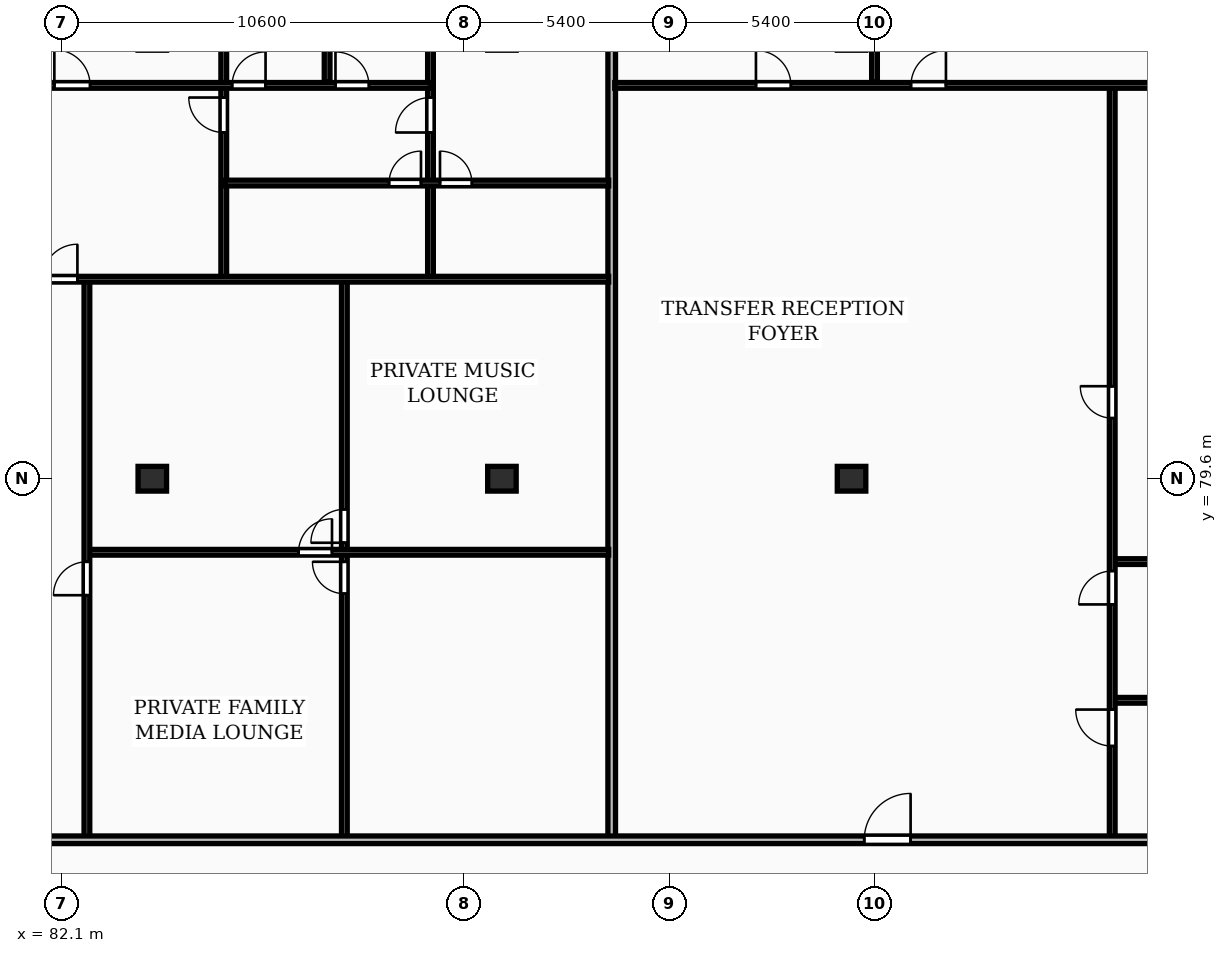
"""IFC4 building model, lengths in metres.
Left out: names, types, materials, properties, quantities, classifications, styles, units other than length and angle.
Written with IfcOpenShell. Run it as: python <this file> out.ifc"""

import sys

from ifc_helpers import new_model, si_unit, direction, frame, frame_2d, origin, origin_2d, place, context, subcontext, project, spatial, rectangle, extrude, element, fill, save


model = new_model("IFC4")
c1 = context("Model", 3, precision=1e-05, world=origin(), true_north=direction((0.0, 1.0)))
c2 = subcontext(c1, "Body", "Model", "MODEL_VIEW")
j1 = project(units=[si_unit("LENGTHUNIT", "METRE"), si_unit("PLANEANGLEUNIT", "RADIAN")], contexts=[c1])
p1 = place(None, origin())
s1 = spatial("IfcSite", under=j1, at=p1, CompositionType="ELEMENT")
p2 = place(p1, origin())
s2 = spatial("IfcBuilding", under=s1, at=p2, CompositionType="ELEMENT")
p3 = place(p2, frame((0.0, 0.0, 256.25)))
s3 = spatial("IfcBuildingStorey", under=s2, at=p3, CompositionType="ELEMENT", Elevation=256.25)
for number, where, z_axis, x_axis in (
    (1, (84.5, 79.6, 0.0), (0.0, 0.0, 1.0), (1.0, 0.0, 0.0)),
    (2, (93.7, 79.6, 0.0), (0.0, 0.0, 1.0), (1.0, 0.0, 0.0)),
    (3, (102.9, 79.6, 0.0), (0.0, 0.0, 1.0), (1.0, 0.0, 0.0)),
):
    element("IfcColumn", number, at=place(p3, frame(where, z_axis=z_axis, x_axis=x_axis)), inside=s3, PredefinedType="COLUMN", context=c2, shape_type="SweptSolid", body=[
        extrude(rectangle(XDim=0.75, YDim=0.65, at=origin_2d()), origin(), (0.0, 0.0, 1.0), 3.45),
    ])
p4 = place(p3, frame((96.589, 70.18, 0.0), z_axis=(0.0, 0.0, 1.0), x_axis=(0.0, 1.0, 0.0)))
e4 = element("IfcWall", 4, at=p4, inside=s3, PredefinedType="PARTITIONING", context=c2, shape_type="SweptSolid", body=[
    extrude(rectangle(XDim=24.32, YDim=0.2, at=frame_2d((12.16, 0.0))), origin(), (0.0, 0.0, 1.0), 3.17),
])
p5 = place(p3, frame((89.554, 70.16, 0.0), z_axis=(0.0, 0.0, 1.0), x_axis=(0.0, 1.0, 0.0)))
e5 = element("IfcWall", 5, at=p5, inside=s3, PredefinedType="PARTITIONING", context=c2, shape_type="SweptSolid", body=[
    extrude(rectangle(XDim=14.65, YDim=0.15, at=frame_2d((7.325, 0.0))), origin(), (0.0, 0.0, 1.0), 3.17),
])
p6 = place(p5, frame((6.415, 0.0, 0.0)))
e6 = element("IfcOpeningElement", 6, at=p6, cuts=e5, PredefinedType="OPENING", context=c2, shape_type="SweptSolid", body=[
    extrude(rectangle(XDim=0.84, YDim=2.04, at=frame_2d((0.42, 1.02))), frame((0.0, 0.085, 0.0), z_axis=(0.0, -1.0, 0.0), x_axis=(1.0, 0.0, 0.0)), (0.0, 0.0, 1.0), 0.17),
])
p7 = place(p5, frame((7.755, 0.0, 0.0)))
e7 = element("IfcOpeningElement", 7, at=p7, cuts=e5, PredefinedType="OPENING", context=c2, shape_type="SweptSolid", body=[
    extrude(rectangle(XDim=0.88, YDim=2.06, at=frame_2d((0.44, 1.03))), frame((0.0, 0.085, 0.0), z_axis=(0.0, -1.0, 0.0), x_axis=(1.0, 0.0, 0.0)), (0.0, 0.0, 1.0), 0.17),
])
p8 = place(p3, frame((82.839, 77.665, 0.0), z_axis=(0.0, 0.0, 1.0), x_axis=(1.0, 0.0, 0.0)))
e8 = element("IfcWall", 8, at=p8, inside=s3, PredefinedType="PARTITIONING", context=c2, shape_type="SweptSolid", body=[
    extrude(rectangle(XDim=13.669, YDim=0.15, at=frame_2d((6.835, 0.0))), origin(), (0.0, 0.0, 1.0), 3.17),
])
p9 = place(p8, frame((5.51, 0.0, 0.0)))
e9 = element("IfcOpeningElement", 9, at=p9, cuts=e8, PredefinedType="OPENING", context=c2, shape_type="SweptSolid", body=[
    extrude(rectangle(XDim=0.88, YDim=2.06, at=frame_2d((0.44, 1.03))), frame((0.0, 0.085, 0.0), z_axis=(0.0, -1.0, 0.0), x_axis=(1.0, 0.0, 0.0)), (0.0, 0.0, 1.0), 0.17),
])
p10 = place(p3, frame((82.779, 70.16, 0.0), z_axis=(0.0, 0.0, 1.0), x_axis=(0.0, 1.0, 0.0)))
e10 = element("IfcWall", 10, at=p10, inside=s3, PredefinedType="PARTITIONING", context=c2, shape_type="SweptSolid", body=[
    extrude(rectangle(XDim=14.65, YDim=0.15, at=frame_2d((7.325, 0.0))), origin(), (0.0, 0.0, 1.0), 3.17),
])
p11 = place(p10, frame((6.375, 0.0, 0.0)))
e11 = element("IfcOpeningElement", 11, at=p11, cuts=e10, PredefinedType="OPENING", context=c2, shape_type="SweptSolid", body=[
    extrude(rectangle(XDim=0.88, YDim=2.06, at=frame_2d((0.44, 1.03))), frame((0.0, 0.085, 0.0), z_axis=(0.0, -1.0, 0.0), x_axis=(1.0, 0.0, 0.0)), (0.0, 0.0, 1.0), 0.17),
])
p12 = place(p3, frame((89.1, 90.03, 0.0), z_axis=(0.0, 0.0, 1.0), x_axis=(0.0, 1.0, 0.0)))
e12 = element("IfcWall", 12, at=p12, inside=s3, PredefinedType="PARTITIONING", context=c2, shape_type="SweptSolid", body=[
    extrude(rectangle(XDim=4.47, YDim=0.15, at=frame_2d((2.235, 0.0))), origin(), (0.0, 0.0, 1.0), 3.17),
])
p13 = place(p3, frame((86.38, 84.89, 0.0), z_axis=(0.0, 0.0, 1.0), x_axis=(0.0, 1.0, 0.0)))
e13 = element("IfcWall", 13, at=p13, inside=s3, PredefinedType="PARTITIONING", context=c2, shape_type="SweptSolid", body=[
    extrude(rectangle(XDim=9.61, YDim=0.15, at=frame_2d((4.805, 0.0))), origin(), (0.0, 0.0, 1.0), 3.17),
])
p14 = place(p13, frame((3.82, 0.0, 0.0)))
e14 = element("IfcOpeningElement", 14, at=p14, cuts=e13, PredefinedType="OPENING", context=c2, shape_type="SweptSolid", body=[
    extrude(rectangle(XDim=0.92, YDim=2.08, at=frame_2d((0.46, 1.04))), frame((0.0, 0.085, 0.0), z_axis=(0.0, -1.0, 0.0), x_axis=(1.0, 0.0, 0.0)), (0.0, 0.0, 1.0), 0.17),
])
p15 = place(p3, frame((91.82, 84.89, 0.0), z_axis=(0.0, 0.0, 1.0), x_axis=(0.0, 1.0, 0.0)))
e15 = element("IfcWall", 15, at=p15, inside=s3, PredefinedType="PARTITIONING", context=c2, shape_type="SweptSolid", body=[
    extrude(rectangle(XDim=2.47, YDim=0.15, at=frame_2d((1.235, 0.0))), origin(), (0.0, 0.0, 1.0), 3.17),
])
p16 = place(p3, frame((91.82, 87.4, 0.0), z_axis=(0.0, 0.0, 1.0), x_axis=(0.0, 1.0, 0.0)))
e16 = element("IfcWall", 16, at=p16, inside=s3, PredefinedType="PARTITIONING", context=c2, shape_type="SweptSolid", body=[
    extrude(rectangle(XDim=7.1, YDim=0.15, at=frame_2d((3.55, 0.0))), origin(), (0.0, 0.0, 1.0), 3.17),
])
p17 = place(p16, frame((1.31, 0.0, 0.0)))
e17 = element("IfcOpeningElement", 17, at=p17, cuts=e16, PredefinedType="OPENING", context=c2, shape_type="SweptSolid", body=[
    extrude(rectangle(XDim=0.92, YDim=2.08, at=frame_2d((0.46, 1.04))), frame((0.0, 0.085, 0.0), z_axis=(0.0, -1.0, 0.0), x_axis=(1.0, 0.0, 0.0)), (0.0, 0.0, 1.0), 0.17),
])
p18 = place(p3, frame((86.42, 87.38, 0.0), z_axis=(0.0, 0.0, 1.0), x_axis=(1.0, 0.0, 0.0)))
e18 = element("IfcWall", 18, at=p18, inside=s3, PredefinedType="PARTITIONING", context=c2, shape_type="SweptSolid", body=[
    extrude(rectangle(XDim=10.089, YDim=0.15, at=frame_2d((5.044, 0.0))), origin(), (0.0, 0.0, 1.0), 3.17),
])
p19 = place(p18, frame((4.31, 0.0, 0.0)))
e19 = element("IfcOpeningElement", 19, at=p19, cuts=e18, PredefinedType="OPENING", context=c2, shape_type="SweptSolid", body=[
    extrude(rectangle(XDim=0.84, YDim=2.04, at=frame_2d((0.42, 1.02))), frame((0.0, 0.085, 0.0), z_axis=(0.0, -1.0, 0.0), x_axis=(1.0, 0.0, 0.0)), (0.0, 0.0, 1.0), 0.17),
])
p20 = place(p18, frame((5.65, 0.0, 0.0)))
e20 = element("IfcOpeningElement", 20, at=p20, cuts=e18, PredefinedType="OPENING", context=c2, shape_type="SweptSolid", body=[
    extrude(rectangle(XDim=0.84, YDim=2.04, at=frame_2d((0.42, 1.02))), frame((0.0, 0.085, 0.0), z_axis=(0.0, -1.0, 0.0), x_axis=(1.0, 0.0, 0.0)), (0.0, 0.0, 1.0), 0.17),
])
p21 = place(p3, frame((78.889, 84.85, 0.0), z_axis=(0.0, 0.0, 1.0), x_axis=(1.0, 0.0, 0.0)))
e21 = element("IfcWall", 21, at=p21, inside=s3, PredefinedType="PARTITIONING", context=c2, shape_type="SweptSolid", body=[
    extrude(rectangle(XDim=17.619, YDim=0.15, at=frame_2d((8.81, 0.0))), origin(), (0.0, 0.0, 1.0), 3.17),
])
p22 = place(p21, frame((2.72, 0.0, 0.0)))
e22 = element("IfcOpeningElement", 22, at=p22, cuts=e21, PredefinedType="OPENING", context=c2, shape_type="SweptSolid", body=[
    extrude(rectangle(XDim=0.92, YDim=2.08, at=frame_2d((0.46, 1.04))), frame((0.0, 0.085, 0.0), z_axis=(0.0, -1.0, 0.0), x_axis=(1.0, 0.0, 0.0)), (0.0, 0.0, 1.0), 0.17),
])
p23 = place(p3, frame((78.889, 89.95, 0.0), z_axis=(0.0, 0.0, 1.0), x_axis=(1.0, 0.0, 0.0)))
e23 = element("IfcWall", 23, at=p23, inside=s3, PredefinedType="PARTITIONING", context=c2, shape_type="SweptSolid", body=[
    extrude(rectangle(XDim=12.931, YDim=0.15, at=frame_2d((6.465, 0.0))), origin(), (0.0, 0.0, 1.0), 3.17),
])
p24 = place(p23, frame((3.033, 0.0, 0.0)))
e24 = element("IfcOpeningElement", 24, at=p24, cuts=e23, PredefinedType="OPENING", context=c2, shape_type="SweptSolid", body=[
    extrude(rectangle(XDim=0.94, YDim=2.1, at=frame_2d((0.47, 1.05))), frame((0.0, 0.085, 0.0), z_axis=(0.0, -1.0, 0.0), x_axis=(1.0, 0.0, 0.0)), (0.0, 0.0, 1.0), 0.17),
])
p25 = place(p23, frame((7.711, 0.0, 0.0)))
e25 = element("IfcOpeningElement", 25, at=p25, cuts=e23, PredefinedType="OPENING", context=c2, shape_type="SweptSolid", body=[
    extrude(rectangle(XDim=0.88, YDim=2.06, at=frame_2d((0.44, 1.03))), frame((0.0, 0.085, 0.0), z_axis=(0.0, -1.0, 0.0), x_axis=(1.0, 0.0, 0.0)), (0.0, 0.0, 1.0), 0.17),
])
p26 = place(p23, frame((10.431, 0.0, 0.0)))
e26 = element("IfcOpeningElement", 26, at=p26, cuts=e23, PredefinedType="OPENING", context=c2, shape_type="SweptSolid", body=[
    extrude(rectangle(XDim=0.88, YDim=2.06, at=frame_2d((0.44, 1.03))), frame((0.0, 0.085, 0.0), z_axis=(0.0, -1.0, 0.0), x_axis=(1.0, 0.0, 0.0)), (0.0, 0.0, 1.0), 0.17),
])
for number, where, z_axis, x_axis in (
    (27, (109.819, 73.77, 0.0), (0.0, 0.0, 1.0), (1.0, 0.0, 0.0)),
    (28, (109.819, 77.42, 0.0), (0.0, 0.0, 1.0), (1.0, 0.0, 0.0)),
):
    element("IfcWall", number, at=place(p3, frame(where, z_axis=z_axis, x_axis=x_axis)), inside=s3, PredefinedType="PARTITIONING", context=c2, shape_type="SweptSolid", body=[
        extrude(rectangle(XDim=3.36, YDim=0.15, at=frame_2d((1.68, 0.0))), origin(), (0.0, 0.0, 1.0), 3.17),
    ])
p27 = place(p3, frame((109.759, 70.16, 0.0), z_axis=(0.0, 0.0, 1.0), x_axis=(0.0, 1.0, 0.0)))
e29 = element("IfcWall", 29, at=p27, inside=s3, PredefinedType="PARTITIONING", context=c2, shape_type="SweptSolid", body=[
    extrude(rectangle(XDim=19.73, YDim=0.15, at=frame_2d((9.865, 0.0))), origin(), (0.0, 0.0, 1.0), 3.17),
])
p28 = place(p27, frame((2.406, 0.0, 0.0)))
e30 = element("IfcOpeningElement", 30, at=p28, cuts=e29, PredefinedType="OPENING", context=c2, shape_type="SweptSolid", body=[
    extrude(rectangle(XDim=0.96, YDim=2.1, at=frame_2d((0.48, 1.05))), frame((0.0, 0.085, 0.0), z_axis=(0.0, -1.0, 0.0), x_axis=(1.0, 0.0, 0.0)), (0.0, 0.0, 1.0), 0.17),
])
p29 = place(p27, frame((6.133, 0.0, 0.0)))
e31 = element("IfcOpeningElement", 31, at=p29, cuts=e29, PredefinedType="OPENING", context=c2, shape_type="SweptSolid", body=[
    extrude(rectangle(XDim=0.88, YDim=2.06, at=frame_2d((0.44, 1.03))), frame((0.0, 0.085, 0.0), z_axis=(0.0, -1.0, 0.0), x_axis=(1.0, 0.0, 0.0)), (0.0, 0.0, 1.0), 0.17),
])
p30 = place(p27, frame((11.034, 0.0, 0.0)))
e32 = element("IfcOpeningElement", 32, at=p30, cuts=e29, PredefinedType="OPENING", context=c2, shape_type="SweptSolid", body=[
    extrude(rectangle(XDim=0.84, YDim=2.04, at=frame_2d((0.42, 1.02))), frame((0.0, 0.085, 0.0), z_axis=(0.0, -1.0, 0.0), x_axis=(1.0, 0.0, 0.0)), (0.0, 0.0, 1.0), 0.17),
])
p31 = place(p3, frame((103.504, 90.03, 0.0), z_axis=(0.0, 0.0, 1.0), x_axis=(0.0, 1.0, 0.0)))
e33 = element("IfcWall", 33, at=p31, inside=s3, PredefinedType="PARTITIONING", context=c2, shape_type="SweptSolid", body=[
    extrude(rectangle(XDim=4.47, YDim=0.15, at=frame_2d((2.235, 0.0))), origin(), (0.0, 0.0, 1.0), 3.17),
])
p32 = place(p3, frame((96.669, 89.95, 0.0), z_axis=(0.0, 0.0, 1.0), x_axis=(1.0, 0.0, 0.0)))
e34 = element("IfcWall", 34, at=p32, inside=s3, PredefinedType="PARTITIONING", context=c2, shape_type="SweptSolid", body=[
    extrude(rectangle(XDim=16.51, YDim=0.15, at=frame_2d((8.255, 0.0))), origin(), (0.0, 0.0, 1.0), 3.17),
])
p33 = place(p32, frame((3.716, 0.0, 0.0)))
e35 = element("IfcOpeningElement", 35, at=p33, cuts=e34, PredefinedType="OPENING", context=c2, shape_type="SweptSolid", body=[
    extrude(rectangle(XDim=0.92, YDim=2.08, at=frame_2d((0.46, 1.04))), frame((0.0, 0.085, 0.0), z_axis=(0.0, -1.0, 0.0), x_axis=(1.0, 0.0, 0.0)), (0.0, 0.0, 1.0), 0.17),
])
p34 = place(p32, frame((7.795, 0.0, 0.0)))
e36 = element("IfcOpeningElement", 36, at=p34, cuts=e34, PredefinedType="OPENING", context=c2, shape_type="SweptSolid", body=[
    extrude(rectangle(XDim=0.92, YDim=2.08, at=frame_2d((0.46, 1.04))), frame((0.0, 0.085, 0.0), z_axis=(0.0, -1.0, 0.0), x_axis=(1.0, 0.0, 0.0)), (0.0, 0.0, 1.0), 0.17),
])
p35 = place(p3, frame((59.8, 70.1, 0.0), z_axis=(0.0, 0.0, 1.0), x_axis=(1.0, 0.0, 0.0)))
e37 = element("IfcWall", 37, at=p35, inside=s3, PredefinedType="PARTITIONING", context=c2, shape_type="SweptSolid", body=[
    extrude(rectangle(XDim=68.6, YDim=0.2, at=frame_2d((34.3, 0.0))), origin(), (0.0, 0.0, 1.0), 3.17),
])
p36 = place(p35, frame((2.045, 0.0, 0.0)))
e38 = element("IfcOpeningElement", 38, at=p36, cuts=e37, PredefinedType="OPENING", context=c2, shape_type="SweptSolid", body=[
    extrude(rectangle(XDim=0.95, YDim=2.15, at=frame_2d((0.475, 1.075))), frame((0.0, 0.11, 0.0), z_axis=(0.0, -1.0, 0.0), x_axis=(1.0, 0.0, 0.0)), (0.0, 0.0, 1.0), 0.22),
])
p37 = place(p35, frame((21.054, 0.0, 0.0)))
e39 = element("IfcOpeningElement", 39, at=p37, cuts=e37, PredefinedType="OPENING", context=c2, shape_type="SweptSolid", body=[
    extrude(rectangle(XDim=0.95, YDim=2.15, at=frame_2d((0.475, 1.075))), frame((0.0, 0.11, 0.0), z_axis=(0.0, -1.0, 0.0), x_axis=(1.0, 0.0, 0.0)), (0.0, 0.0, 1.0), 0.22),
])
p38 = place(p35, frame((43.434, 0.0, 0.0)))
e40 = element("IfcOpeningElement", 40, at=p38, cuts=e37, PredefinedType="OPENING", context=c2, shape_type="SweptSolid", body=[
    extrude(rectangle(XDim=1.22, YDim=2.18, at=frame_2d((0.61, 1.09))), frame((0.0, 0.11, 0.0), z_axis=(0.0, -1.0, 0.0), x_axis=(1.0, 0.0, 0.0)), (0.0, 0.0, 1.0), 0.22),
])
p39 = place(p35, frame((59.455, 0.0, 0.0)))
e41 = element("IfcOpeningElement", 41, at=p39, cuts=e37, PredefinedType="OPENING", context=c2, shape_type="SweptSolid", body=[
    extrude(rectangle(XDim=1.22, YDim=2.18, at=frame_2d((0.61, 1.09))), frame((0.0, 0.11, 0.0), z_axis=(0.0, -1.0, 0.0), x_axis=(1.0, 0.0, 0.0)), (0.0, 0.0, 1.0), 0.22),
])
p40 = place(p6, origin())
e42 = element("IfcDoor", 42, at=p40, inside=s3, OperationType="SINGLE_SWING_RIGHT", PredefinedType="DOOR", context=c2, shape_type="SweptSolid", body=[
    extrude(rectangle(XDim=0.84, YDim=2.04, at=frame_2d((0.42, 1.02))), frame((0.0, 0.025, 0.0), z_axis=(0.0, -1.0, 0.0), x_axis=(1.0, 0.0, 0.0)), (0.0, 0.0, 1.0), 0.05),
])
fill(e6, e42)
p41 = place(p7, origin())
e43 = element("IfcDoor", 43, at=p41, inside=s3, OperationType="SINGLE_SWING_LEFT", PredefinedType="DOOR", context=c2, shape_type="SweptSolid", body=[
    extrude(rectangle(XDim=0.88, YDim=2.06, at=frame_2d((0.44, 1.03))), frame((0.0, 0.025, 0.0), z_axis=(0.0, -1.0, 0.0), x_axis=(1.0, 0.0, 0.0)), (0.0, 0.0, 1.0), 0.05),
])
fill(e7, e43)
p42 = place(p9, origin())
e44 = element("IfcDoor", 44, at=p42, inside=s3, OperationType="SINGLE_SWING_RIGHT", PredefinedType="DOOR", context=c2, shape_type="SweptSolid", body=[
    extrude(rectangle(XDim=0.88, YDim=2.06, at=frame_2d((0.44, 1.03))), frame((0.0, 0.025, 0.0), z_axis=(0.0, -1.0, 0.0), x_axis=(1.0, 0.0, 0.0)), (0.0, 0.0, 1.0), 0.05),
])
fill(e9, e44)
p43 = place(p11, origin())
e45 = element("IfcDoor", 45, at=p43, inside=s3, OperationType="SINGLE_SWING_LEFT", PredefinedType="DOOR", context=c2, shape_type="SweptSolid", body=[
    extrude(rectangle(XDim=0.88, YDim=2.06, at=frame_2d((0.44, 1.03))), frame((0.0, 0.025, 0.0), z_axis=(0.0, -1.0, 0.0), x_axis=(1.0, 0.0, 0.0)), (0.0, 0.0, 1.0), 0.05),
])
fill(e11, e45)
p44 = place(p14, origin())
e46 = element("IfcDoor", 46, at=p44, inside=s3, OperationType="SINGLE_SWING_RIGHT", PredefinedType="DOOR", context=c2, shape_type="SweptSolid", body=[
    extrude(rectangle(XDim=0.92, YDim=2.08, at=frame_2d((0.46, 1.04))), frame((0.0, 0.025, 0.0), z_axis=(0.0, -1.0, 0.0), x_axis=(1.0, 0.0, 0.0)), (0.0, 0.0, 1.0), 0.05),
])
fill(e14, e46)
p45 = place(p17, origin())
e47 = element("IfcDoor", 47, at=p45, inside=s3, OperationType="SINGLE_SWING_LEFT", PredefinedType="DOOR", context=c2, shape_type="SweptSolid", body=[
    extrude(rectangle(XDim=0.92, YDim=2.08, at=frame_2d((0.46, 1.04))), frame((0.0, 0.025, 0.0), z_axis=(0.0, -1.0, 0.0), x_axis=(1.0, 0.0, 0.0)), (0.0, 0.0, 1.0), 0.05),
])
fill(e17, e47)
p46 = place(p19, origin())
e48 = element("IfcDoor", 48, at=p46, inside=s3, OperationType="SINGLE_SWING_RIGHT", PredefinedType="DOOR", context=c2, shape_type="SweptSolid", body=[
    extrude(rectangle(XDim=0.84, YDim=2.04, at=frame_2d((0.42, 1.02))), frame((0.0, 0.025, 0.0), z_axis=(0.0, -1.0, 0.0), x_axis=(1.0, 0.0, 0.0)), (0.0, 0.0, 1.0), 0.05),
])
fill(e19, e48)
p47 = place(p20, origin())
e49 = element("IfcDoor", 49, at=p47, inside=s3, OperationType="SINGLE_SWING_LEFT", PredefinedType="DOOR", context=c2, shape_type="SweptSolid", body=[
    extrude(rectangle(XDim=0.84, YDim=2.04, at=frame_2d((0.42, 1.02))), frame((0.0, 0.025, 0.0), z_axis=(0.0, -1.0, 0.0), x_axis=(1.0, 0.0, 0.0)), (0.0, 0.0, 1.0), 0.05),
])
fill(e20, e49)
p48 = place(p22, origin())
e50 = element("IfcDoor", 50, at=p48, inside=s3, OperationType="SINGLE_SWING_RIGHT", PredefinedType="DOOR", context=c2, shape_type="SweptSolid", body=[
    extrude(rectangle(XDim=0.92, YDim=2.08, at=frame_2d((0.46, 1.04))), frame((0.0, 0.025, 0.0), z_axis=(0.0, -1.0, 0.0), x_axis=(1.0, 0.0, 0.0)), (0.0, 0.0, 1.0), 0.05),
])
fill(e22, e50)
p49 = place(p24, origin())
e51 = element("IfcDoor", 51, at=p49, inside=s3, OperationType="SINGLE_SWING_LEFT", PredefinedType="DOOR", context=c2, shape_type="SweptSolid", body=[
    extrude(rectangle(XDim=0.94, YDim=2.1, at=frame_2d((0.47, 1.05))), frame((0.0, 0.025, 0.0), z_axis=(0.0, -1.0, 0.0), x_axis=(1.0, 0.0, 0.0)), (0.0, 0.0, 1.0), 0.05),
])
fill(e24, e51)
p50 = place(p25, origin())
e52 = element("IfcDoor", 52, at=p50, inside=s3, OperationType="SINGLE_SWING_RIGHT", PredefinedType="DOOR", context=c2, shape_type="SweptSolid", body=[
    extrude(rectangle(XDim=0.88, YDim=2.06, at=frame_2d((0.44, 1.03))), frame((0.0, 0.025, 0.0), z_axis=(0.0, -1.0, 0.0), x_axis=(1.0, 0.0, 0.0)), (0.0, 0.0, 1.0), 0.05),
])
fill(e25, e52)
p51 = place(p26, origin())
e53 = element("IfcDoor", 53, at=p51, inside=s3, OperationType="SINGLE_SWING_LEFT", PredefinedType="DOOR", context=c2, shape_type="SweptSolid", body=[
    extrude(rectangle(XDim=0.88, YDim=2.06, at=frame_2d((0.44, 1.03))), frame((0.0, 0.025, 0.0), z_axis=(0.0, -1.0, 0.0), x_axis=(1.0, 0.0, 0.0)), (0.0, 0.0, 1.0), 0.05),
])
fill(e26, e53)
p52 = place(p28, origin())
e54 = element("IfcDoor", 54, at=p52, inside=s3, OperationType="SINGLE_SWING_RIGHT", PredefinedType="DOOR", context=c2, shape_type="SweptSolid", body=[
    extrude(rectangle(XDim=0.96, YDim=2.1, at=frame_2d((0.48, 1.05))), frame((0.0, 0.025, 0.0), z_axis=(0.0, -1.0, 0.0), x_axis=(1.0, 0.0, 0.0)), (0.0, 0.0, 1.0), 0.05),
])
fill(e30, e54)
p53 = place(p29, origin())
e55 = element("IfcDoor", 55, at=p53, inside=s3, OperationType="SINGLE_SWING_LEFT", PredefinedType="DOOR", context=c2, shape_type="SweptSolid", body=[
    extrude(rectangle(XDim=0.88, YDim=2.06, at=frame_2d((0.44, 1.03))), frame((0.0, 0.025, 0.0), z_axis=(0.0, -1.0, 0.0), x_axis=(1.0, 0.0, 0.0)), (0.0, 0.0, 1.0), 0.05),
])
fill(e31, e55)
p54 = place(p30, origin())
e56 = element("IfcDoor", 56, at=p54, inside=s3, OperationType="SINGLE_SWING_RIGHT", PredefinedType="DOOR", context=c2, shape_type="SweptSolid", body=[
    extrude(rectangle(XDim=0.84, YDim=2.04, at=frame_2d((0.42, 1.02))), frame((0.0, 0.025, 0.0), z_axis=(0.0, -1.0, 0.0), x_axis=(1.0, 0.0, 0.0)), (0.0, 0.0, 1.0), 0.05),
])
fill(e32, e56)
p55 = place(p33, origin())
e57 = element("IfcDoor", 57, at=p55, inside=s3, OperationType="SINGLE_SWING_LEFT", PredefinedType="DOOR", context=c2, shape_type="SweptSolid", body=[
    extrude(rectangle(XDim=0.92, YDim=2.08, at=frame_2d((0.46, 1.04))), frame((0.0, 0.025, 0.0), z_axis=(0.0, -1.0, 0.0), x_axis=(1.0, 0.0, 0.0)), (0.0, 0.0, 1.0), 0.05),
])
fill(e35, e57)
p56 = place(p34, origin())
e58 = element("IfcDoor", 58, at=p56, inside=s3, OperationType="SINGLE_SWING_RIGHT", PredefinedType="DOOR", context=c2, shape_type="SweptSolid", body=[
    extrude(rectangle(XDim=0.92, YDim=2.08, at=frame_2d((0.46, 1.04))), frame((0.0, 0.025, 0.0), z_axis=(0.0, -1.0, 0.0), x_axis=(1.0, 0.0, 0.0)), (0.0, 0.0, 1.0), 0.05),
])
fill(e36, e58)
p57 = place(p38, origin())
e59 = element("IfcDoor", 59, at=p57, inside=s3, OperationType="SINGLE_SWING_RIGHT", PredefinedType="DOOR", context=c2, shape_type="SweptSolid", body=[
    extrude(rectangle(XDim=1.22, YDim=2.18, at=frame_2d((0.61, 1.09))), frame((0.0, 0.025, 0.0), z_axis=(0.0, -1.0, 0.0), x_axis=(1.0, 0.0, 0.0)), (0.0, 0.0, 1.0), 0.05),
])
fill(e40, e59)
save(model, sys.argv[1])
